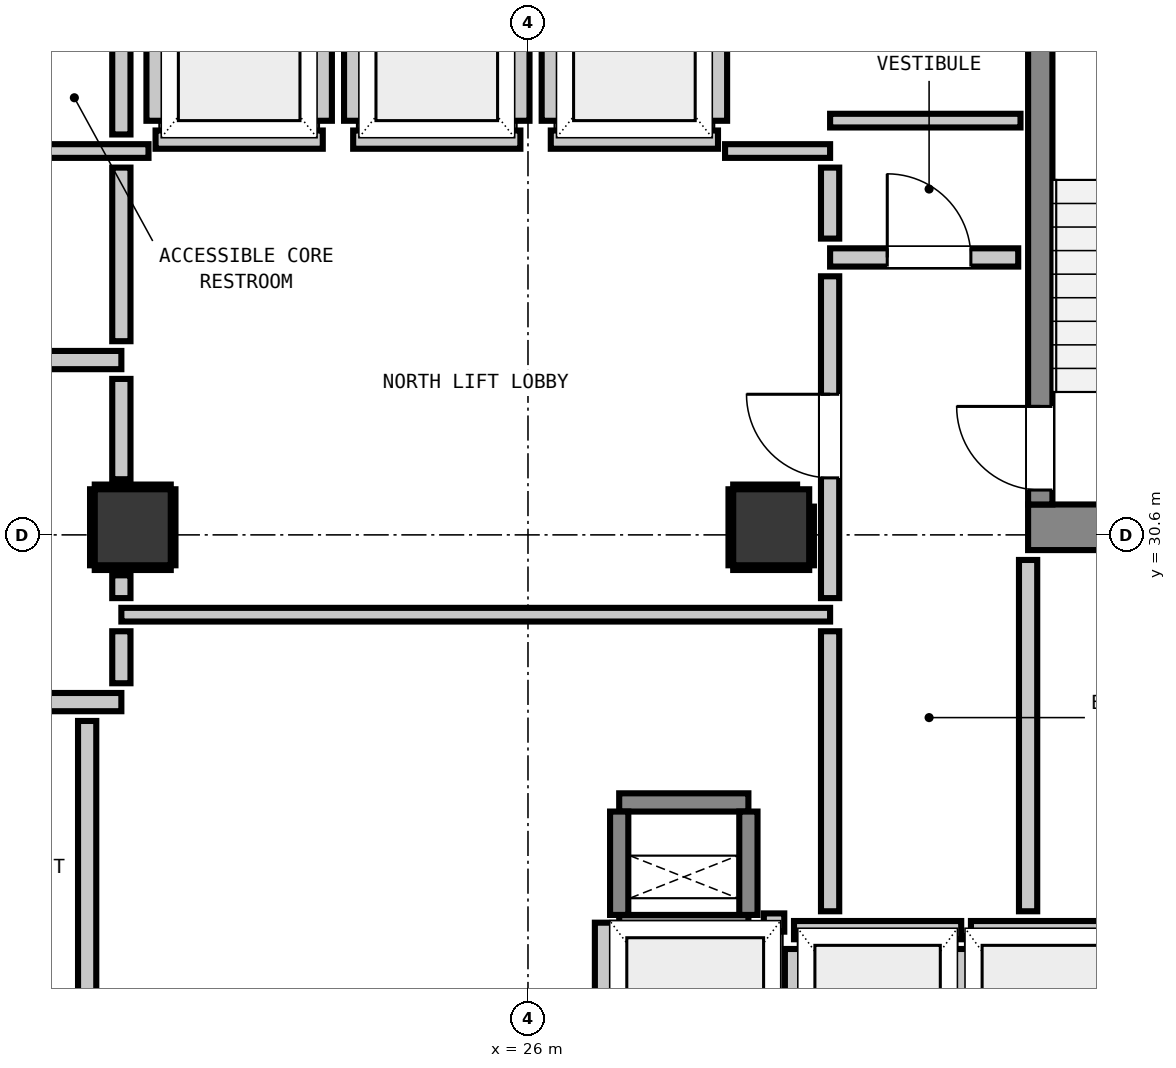
"""IFC4 building model, lengths in metres.
Left out: names, types, materials, properties, quantities, classifications, styles, units other than length and angle.
Written with IfcOpenShell. Run it as: python <this file> out.ifc"""

import sys

from ifc_helpers import new_model, si_unit, direction, frame, frame_2d, origin, origin_2d, place, context, subcontext, project, spatial, rectangle, extrude, element, fill, save


model = new_model("IFC4")
c1 = context("Model", 3, precision=1e-05, world=origin(), true_north=direction((0.0, 1.0)))
c2 = subcontext(c1, "Body", "Model", "MODEL_VIEW")
j1 = project(units=[si_unit("LENGTHUNIT", "METRE"), si_unit("PLANEANGLEUNIT", "RADIAN")], contexts=[c1])
p1 = place(None, origin())
s1 = spatial("IfcSite", under=j1, at=p1, CompositionType="ELEMENT")
p2 = place(p1, origin())
s2 = spatial("IfcBuilding", under=s1, at=p2, CompositionType="ELEMENT")
p3 = place(p2, frame((0.0, 0.0, 25.32)))
s3 = spatial("IfcBuildingStorey", under=s2, at=p3, CompositionType="ELEMENT", Elevation=25.32)
p4 = place(p3, frame((32.58, 30.7, 0.0), z_axis=(0.0, 0.0, 1.0), x_axis=(1.0, 0.0, 0.0)))
e1 = element("IfcWall", 1, at=p4, inside=s3, PredefinedType="SHEAR", context=c2, shape_type="SweptSolid", body=[
    extrude(rectangle(XDim=3.415, YDim=0.6, at=frame_2d((1.708, 0.0))), origin(), (0.0, 0.0, 1.0), 3.32),
])
p5 = place(p3, frame((32.74, 31.0, 0.0), z_axis=(0.0, 0.0, 1.0), x_axis=(0.0, 1.0, 0.0)))
e2 = element("IfcWall", 2, at=p5, inside=s3, PredefinedType="SHEAR", context=c2, shape_type="SweptSolid", body=[
    extrude(rectangle(XDim=7.8, YDim=0.32, at=frame_2d((3.9, 0.0))), origin(), (0.0, 0.0, 1.0), 3.32),
])
p6 = place(p5, frame((0.19, 0.0, 0.0)))
e3 = element("IfcOpeningElement", 3, at=p6, cuts=e2, PredefinedType="OPENING", context=c2, shape_type="SweptSolid", body=[
    extrude(rectangle(XDim=1.1, YDim=2.15, at=frame_2d((0.55, 1.075))), frame((0.0, 0.17, 0.0), z_axis=(0.0, -1.0, 0.0), x_axis=(1.0, 0.0, 0.0)), (0.0, 0.0, 1.0), 0.34),
])
for number, where, z_axis, x_axis in (
    (4, (27.2, 25.48, 0.0), (0.0, 0.0, 1.0), (1.0, 0.0, 0.0)),
    (5, (27.2, 27.08, 0.0), (0.0, 0.0, 1.0), (1.0, 0.0, 0.0)),
):
    element("IfcWall", number, at=place(p3, frame(where, z_axis=z_axis, x_axis=x_axis)), inside=s3, PredefinedType="SHEAR", context=c2, shape_type="SweptSolid", body=[
        extrude(rectangle(XDim=1.7, YDim=0.24, at=frame_2d((0.85, 0.0))), origin(), (0.0, 0.0, 1.0), 3.32),
    ])
for number, where, z_axis, x_axis in (
    (6, (27.2, 25.6, 0.0), (0.0, 0.0, 1.0), (0.0, 1.0, 0.0)),
    (7, (28.9, 25.6, 0.0), (0.0, 0.0, 1.0), (0.0, 1.0, 0.0)),
):
    element("IfcWall", number, at=place(p3, frame(where, z_axis=z_axis, x_axis=x_axis)), inside=s3, PredefinedType="SHEAR", context=c2, shape_type="SweptSolid", body=[
        extrude(rectangle(XDim=1.36, YDim=0.24, at=frame_2d((0.68, 0.0))), origin(), (0.0, 0.0, 1.0), 3.32),
    ])
for number, where, z_axis, x_axis in (
    (8, (20.8, 30.7, 0.0), (0.0, 0.0, 1.0), (1.0, 0.0, 0.0)),
    (9, (29.2, 30.7, 0.0), (0.0, 0.0, 1.0), (1.0, 0.0, 0.0)),
):
    element("IfcColumn", number, at=place(p3, frame(where, z_axis=z_axis, x_axis=x_axis)), inside=s3, PredefinedType="COLUMN", context=c2, shape_type="SweptSolid", body=[
        extrude(rectangle(XDim=1.0, YDim=1.0, at=origin_2d()), origin(), (0.0, 0.0, 1.0), 3.32),
    ])
p7 = place(p3, frame((21.1, 35.8, 0.0), z_axis=(0.0, 0.0, 1.0), x_axis=(1.0, 0.0, 0.0)))
e10 = element("IfcWall", 10, at=p7, inside=s3, PredefinedType="PARTITIONING", context=c2, shape_type="SweptSolid", body=[
    extrude(rectangle(XDim=2.2, YDim=0.24, at=frame_2d((1.1, 0.0))), origin(), (0.0, 0.0, 1.0), 3.06),
])
p8 = place(p3, frame((21.1, 36.048, 0.0), z_axis=(0.0, 0.0, 1.0), x_axis=(0.0, 1.0, 0.0)))
e11 = element("IfcWall", 11, at=p8, inside=s3, PredefinedType="PARTITIONING", context=c2, shape_type="SweptSolid", body=[
    extrude(rectangle(XDim=2.104, YDim=0.24, at=frame_2d((1.052, 0.0))), origin(), (0.0, 0.0, 1.0), 2.295),
])
p9 = place(p3, frame((23.3, 36.048, 0.0), z_axis=(0.0, 0.0, 1.0), x_axis=(0.0, 1.0, 0.0)))
e12 = element("IfcWall", 12, at=p9, inside=s3, PredefinedType="PARTITIONING", context=c2, shape_type="SweptSolid", body=[
    extrude(rectangle(XDim=2.104, YDim=0.24, at=frame_2d((1.052, 0.0))), origin(), (0.0, 0.0, 1.0), 3.06),
])
p10 = place(p3, frame((23.7, 35.8, 0.0), z_axis=(0.0, 0.0, 1.0), x_axis=(1.0, 0.0, 0.0)))
e13 = element("IfcWall", 13, at=p10, inside=s3, PredefinedType="PARTITIONING", context=c2, shape_type="SweptSolid", body=[
    extrude(rectangle(XDim=2.2, YDim=0.24, at=frame_2d((1.1, 0.0))), origin(), (0.0, 0.0, 1.0), 3.06),
])
for number, where, z_axis, x_axis in (
    (14, (23.7, 36.048, 0.0), (0.0, 0.0, 1.0), (0.0, 1.0, 0.0)),
    (15, (25.9, 36.048, 0.0), (0.0, 0.0, 1.0), (0.0, 1.0, 0.0)),
):
    element("IfcWall", number, at=place(p3, frame(where, z_axis=z_axis, x_axis=x_axis)), inside=s3, PredefinedType="PARTITIONING", context=c2, shape_type="SweptSolid", body=[
        extrude(rectangle(XDim=2.104, YDim=0.24, at=frame_2d((1.052, 0.0))), origin(), (0.0, 0.0, 1.0), 3.06),
    ])
p11 = place(p3, frame((26.3, 35.8, 0.0), z_axis=(0.0, 0.0, 1.0), x_axis=(1.0, 0.0, 0.0)))
e16 = element("IfcWall", 16, at=p11, inside=s3, PredefinedType="PARTITIONING", context=c2, shape_type="SweptSolid", body=[
    extrude(rectangle(XDim=2.2, YDim=0.24, at=frame_2d((1.1, 0.0))), origin(), (0.0, 0.0, 1.0), 3.06),
])
for number, where, z_axis, x_axis in (
    (17, (26.3, 36.048, 0.0), (0.0, 0.0, 1.0), (0.0, 1.0, 0.0)),
    (18, (28.5, 36.048, 0.0), (0.0, 0.0, 1.0), (0.0, 1.0, 0.0)),
):
    element("IfcWall", number, at=place(p3, frame(where, z_axis=z_axis, x_axis=x_axis)), inside=s3, PredefinedType="PARTITIONING", context=c2, shape_type="SweptSolid", body=[
        extrude(rectangle(XDim=2.104, YDim=0.24, at=frame_2d((1.052, 0.0))), origin(), (0.0, 0.0, 1.0), 3.06),
    ])
p12 = place(p3, frame((29.5, 25.4, 0.0), z_axis=(0.0, 0.0, 1.0), x_axis=(1.0, 0.0, 0.0)))
e19 = element("IfcWall", 19, at=p12, inside=s3, PredefinedType="PARTITIONING", context=c2, shape_type="SweptSolid", body=[
    extrude(rectangle(XDim=2.2, YDim=0.24, at=frame_2d((1.1, 0.0))), origin(), (0.0, 0.0, 1.0), 3.06),
])
p13 = place(p3, frame((29.5, 22.632, 0.0), z_axis=(0.0, 0.0, 1.0), x_axis=(0.0, 1.0, 0.0)))
e20 = element("IfcWall", 20, at=p13, inside=s3, PredefinedType="PARTITIONING", context=c2, shape_type="SweptSolid", body=[
    extrude(rectangle(XDim=2.52, YDim=0.24, at=frame_2d((1.26, 0.0))), origin(), (0.0, 0.0, 1.0), 2.295),
])
p14 = place(p3, frame((31.7, 22.73, 0.0), z_axis=(0.0, 0.0, 1.0), x_axis=(0.0, 1.0, 0.0)))
e21 = element("IfcWall", 21, at=p14, inside=s3, PredefinedType="PARTITIONING", context=c2, shape_type="SweptSolid", body=[
    extrude(rectangle(XDim=2.422, YDim=0.24, at=frame_2d((1.211, 0.0))), origin(), (0.0, 0.0, 1.0), 3.06),
])
p15 = place(p3, frame((31.828, 25.4, 0.0), z_axis=(0.0, 0.0, 1.0), x_axis=(1.0, 0.0, 0.0)))
e22 = element("IfcWall", 22, at=p15, inside=s3, PredefinedType="PARTITIONING", context=c2, shape_type="SweptSolid", body=[
    extrude(rectangle(XDim=2.072, YDim=0.24, at=frame_2d((1.036, 0.0))), origin(), (0.0, 0.0, 1.0), 3.06),
])
p16 = place(p3, frame((29.103, 25.5, 0.0), z_axis=(0.0, 0.0, 1.0), x_axis=(1.0, 0.0, 0.0)))
e23 = element("IfcWall", 23, at=p16, inside=s3, PredefinedType="PARTITIONING", context=c2, shape_type="SweptSolid", body=[
    extrude(rectangle(XDim=0.269, YDim=0.24, at=frame_2d((0.135, 0.0))), origin(), (0.0, 0.0, 1.0), 3.06),
])
p17 = place(p3, frame((27.0, 22.73, 0.0), z_axis=(0.0, 0.0, 1.0), x_axis=(0.0, 1.0, 0.0)))
e24 = element("IfcWall", 24, at=p17, inside=s3, PredefinedType="PARTITIONING", context=c2, shape_type="SweptSolid", body=[
    extrude(rectangle(XDim=2.768, YDim=0.24, at=frame_2d((1.384, 0.0))), origin(), (0.0, 0.0, 1.0), 3.06),
])
p18 = place(p3, frame((17.45, 28.4, 0.0), z_axis=(0.0, 0.0, 1.0), x_axis=(1.0, 0.0, 0.0)))
e25 = element("IfcWall", 25, at=p18, inside=s3, PredefinedType="PARTITIONING", context=c2, shape_type="SweptSolid", body=[
    extrude(rectangle(XDim=3.2, YDim=0.24, at=frame_2d((1.6, 0.0))), origin(), (0.0, 0.0, 1.0), 3.06),
])
p19 = place(p18, frame((0.784, 0.0, 0.0)))
e26 = element("IfcOpeningElement", 26, at=p19, cuts=e25, PredefinedType="OPENING", context=c2, shape_type="SweptSolid", body=[
    extrude(rectangle(XDim=1.1, YDim=2.15, at=frame_2d((0.55, 1.075))), frame((0.0, 0.13, 0.0), z_axis=(0.0, -1.0, 0.0), x_axis=(1.0, 0.0, 0.0)), (0.0, 0.0, 1.0), 0.26),
])
p20 = place(p3, frame((17.45, 32.9, 0.0), z_axis=(0.0, 0.0, 1.0), x_axis=(1.0, 0.0, 0.0)))
e27 = element("IfcWall", 27, at=p20, inside=s3, PredefinedType="PARTITIONING", context=c2, shape_type="SweptSolid", body=[
    extrude(rectangle(XDim=3.2, YDim=0.24, at=frame_2d((1.6, 0.0))), origin(), (0.0, 0.0, 1.0), 3.06),
])
p21 = place(p20, frame((0.159, 0.0, 0.0)))
e28 = element("IfcOpeningElement", 28, at=p21, cuts=e27, PredefinedType="OPENING", context=c2, shape_type="SweptSolid", body=[
    extrude(rectangle(XDim=1.1, YDim=2.15, at=frame_2d((0.55, 1.075))), frame((0.0, 0.13, 0.0), z_axis=(0.0, -1.0, 0.0), x_axis=(1.0, 0.0, 0.0)), (0.0, 0.0, 1.0), 0.26),
])
p22 = place(p3, frame((29.975, 34.25, 0.0), z_axis=(0.0, 0.0, 1.0), x_axis=(1.0, 0.0, 0.0)))
e29 = element("IfcWall", 29, at=p22, inside=s3, PredefinedType="PARTITIONING", context=c2, shape_type="SweptSolid", body=[
    extrude(rectangle(XDim=2.475, YDim=0.24, at=frame_2d((1.237, 0.0))), origin(), (0.0, 0.0, 1.0), 3.06),
])
p23 = place(p22, frame((0.752, 0.0, 0.0)))
e30 = element("IfcOpeningElement", 30, at=p23, cuts=e29, PredefinedType="OPENING", context=c2, shape_type="SweptSolid", body=[
    extrude(rectangle(XDim=1.1, YDim=2.15, at=frame_2d((0.55, 1.075))), frame((0.0, 0.13, 0.0), z_axis=(0.0, -1.0, 0.0), x_axis=(1.0, 0.0, 0.0)), (0.0, 0.0, 1.0), 0.26),
])
p24 = place(p3, frame((20.65, 29.55, 0.0), z_axis=(0.0, 0.0, 1.0), x_axis=(1.0, 0.0, 0.0)))
e31 = element("IfcWall", 31, at=p24, inside=s3, PredefinedType="PARTITIONING", context=c2, shape_type="SweptSolid", body=[
    extrude(rectangle(XDim=9.325, YDim=0.18, at=frame_2d((4.663, 0.0))), origin(), (0.0, 0.0, 1.0), 3.06),
])
p25 = place(p3, frame((18.95, 35.65, 0.0), z_axis=(0.0, 0.0, 1.0), x_axis=(1.0, 0.0, 0.0)))
e32 = element("IfcWall", 32, at=p25, inside=s3, PredefinedType="PARTITIONING", context=c2, shape_type="SweptSolid", body=[
    extrude(rectangle(XDim=2.057, YDim=0.18, at=frame_2d((1.029, 0.0))), origin(), (0.0, 0.0, 1.0), 3.06),
])
p26 = place(p3, frame((28.593, 35.65, 0.0), z_axis=(0.0, 0.0, 1.0), x_axis=(1.0, 0.0, 0.0)))
e33 = element("IfcWall", 33, at=p26, inside=s3, PredefinedType="PARTITIONING", context=c2, shape_type="SweptSolid", body=[
    extrude(rectangle(XDim=1.382, YDim=0.18, at=frame_2d((0.691, 0.0))), origin(), (0.0, 0.0, 1.0), 3.06),
])
p27 = place(p3, frame((29.975, 36.05, 0.0), z_axis=(0.0, 0.0, 1.0), x_axis=(1.0, 0.0, 0.0)))
e34 = element("IfcWall", 34, at=p27, inside=s3, PredefinedType="PARTITIONING", context=c2, shape_type="SweptSolid", body=[
    extrude(rectangle(XDim=2.505, YDim=0.18, at=frame_2d((1.252, 0.0))), origin(), (0.0, 0.0, 1.0), 3.06),
])
p28 = place(p3, frame((20.2, 22.586, 0.0), z_axis=(0.0, 0.0, 1.0), x_axis=(0.0, 1.0, 0.0)))
e35 = element("IfcWall", 35, at=p28, inside=s3, PredefinedType="PARTITIONING", context=c2, shape_type="SweptSolid", body=[
    extrude(rectangle(XDim=5.566, YDim=0.24, at=frame_2d((2.783, 0.0))), origin(), (0.0, 0.0, 1.0), 3.06),
])
p29 = place(p3, frame((20.65, 28.648, 0.0), z_axis=(0.0, 0.0, 1.0), x_axis=(0.0, 1.0, 0.0)))
e36 = element("IfcWall", 36, at=p29, inside=s3, PredefinedType="PARTITIONING", context=c2, shape_type="SweptSolid", body=[
    extrude(rectangle(XDim=0.684, YDim=0.24, at=frame_2d((0.342, 0.0))), origin(), (0.0, 0.0, 1.0), 2.295),
])
p30 = place(p3, frame((20.65, 29.768, 0.0), z_axis=(0.0, 0.0, 1.0), x_axis=(0.0, 1.0, 0.0)))
e37 = element("IfcWall", 37, at=p30, inside=s3, PredefinedType="PARTITIONING", context=c2, shape_type="SweptSolid", body=[
    extrude(rectangle(XDim=0.3, YDim=0.24, at=frame_2d((0.15, 0.0))), origin(), (0.0, 0.0, 1.0), 2.295),
])
p31 = place(p3, frame((20.65, 31.332, 0.0), z_axis=(0.0, 0.0, 1.0), x_axis=(0.0, 1.0, 0.0)))
e38 = element("IfcWall", 38, at=p31, inside=s3, PredefinedType="PARTITIONING", context=c2, shape_type="SweptSolid", body=[
    extrude(rectangle(XDim=1.32, YDim=0.24, at=frame_2d((0.66, 0.0))), origin(), (0.0, 0.0, 1.0), 2.295),
])
p32 = place(p3, frame((20.65, 33.148, 0.0), z_axis=(0.0, 0.0, 1.0), x_axis=(0.0, 1.0, 0.0)))
e39 = element("IfcWall", 39, at=p32, inside=s3, PredefinedType="PARTITIONING", context=c2, shape_type="SweptSolid", body=[
    extrude(rectangle(XDim=2.284, YDim=0.24, at=frame_2d((1.142, 0.0))), origin(), (0.0, 0.0, 1.0), 2.295),
])
p33 = place(p3, frame((20.65, 35.868, 0.0), z_axis=(0.0, 0.0, 1.0), x_axis=(0.0, 1.0, 0.0)))
e40 = element("IfcWall", 40, at=p33, inside=s3, PredefinedType="PARTITIONING", context=c2, shape_type="SweptSolid", body=[
    extrude(rectangle(XDim=2.684, YDim=0.24, at=frame_2d((1.342, 0.0))), origin(), (0.0, 0.0, 1.0), 2.295),
])
p34 = place(p3, frame((29.975, 25.648, 0.0), z_axis=(0.0, 0.0, 1.0), x_axis=(0.0, 1.0, 0.0)))
e41 = element("IfcWall", 41, at=p34, inside=s3, PredefinedType="PARTITIONING", context=c2, shape_type="SweptSolid", body=[
    extrude(rectangle(XDim=3.684, YDim=0.24, at=frame_2d((1.842, 0.0))), origin(), (0.0, 0.0, 1.0), 3.06),
])
p35 = place(p3, frame((29.975, 29.768, 0.0), z_axis=(0.0, 0.0, 1.0), x_axis=(0.0, 1.0, 0.0)))
e42 = element("IfcWall", 42, at=p35, inside=s3, PredefinedType="PARTITIONING", context=c2, shape_type="SweptSolid", body=[
    extrude(rectangle(XDim=4.234, YDim=0.24, at=frame_2d((2.117, 0.0))), origin(), (0.0, 0.0, 1.0), 3.06),
])
p36 = place(p35, frame((1.582, 0.0, 0.0)))
e43 = element("IfcOpeningElement", 43, at=p36, cuts=e42, PredefinedType="OPENING", context=c2, shape_type="SweptSolid", body=[
    extrude(rectangle(XDim=1.1, YDim=2.15, at=frame_2d((0.55, 1.075))), frame((0.0, 0.13, 0.0), z_axis=(0.0, -1.0, 0.0), x_axis=(1.0, 0.0, 0.0)), (0.0, 0.0, 1.0), 0.26),
])
p37 = place(p3, frame((29.975, 34.498, 0.0), z_axis=(0.0, 0.0, 1.0), x_axis=(0.0, 1.0, 0.0)))
e44 = element("IfcWall", 44, at=p37, inside=s3, PredefinedType="PARTITIONING", context=c2, shape_type="SweptSolid", body=[
    extrude(rectangle(XDim=0.934, YDim=0.24, at=frame_2d((0.467, 0.0))), origin(), (0.0, 0.0, 1.0), 3.06),
])
p38 = place(p3, frame((32.58, 25.648, 0.0), z_axis=(0.0, 0.0, 1.0), x_axis=(0.0, 1.0, 0.0)))
e45 = element("IfcWall", 45, at=p38, inside=s3, PredefinedType="PARTITIONING", context=c2, shape_type="SweptSolid", body=[
    extrude(rectangle(XDim=4.622, YDim=0.24, at=frame_2d((2.311, 0.0))), origin(), (0.0, 0.0, 1.0), 3.06),
])
for number, where, z_axis, x_axis in (
    (46, (20.3, 30.168, 0.0), (0.0, 0.0, 1.0), (1.0, 0.0, 0.0)),
    (47, (20.3, 31.232, 0.0), (0.0, 0.0, 1.0), (1.0, 0.0, 0.0)),
    (48, (20.268, 30.2, 0.0), (0.0, 0.0, 1.0), (0.0, 1.0, 0.0)),
    (49, (21.332, 30.2, 0.0), (0.0, 0.0, 1.0), (0.0, 1.0, 0.0)),
    (50, (28.7, 30.168, 0.0), (0.0, 0.0, 1.0), (1.0, 0.0, 0.0)),
):
    element("IfcWall", number, at=place(p3, frame(where, z_axis=z_axis, x_axis=x_axis)), inside=s3, PredefinedType="PARTITIONING", context=c2, shape_type="SweptSolid", body=[
        extrude(rectangle(XDim=1.0, YDim=0.06, at=frame_2d((0.5, 0.0))), origin(), (0.0, 0.0, 1.0), 1.45),
    ])
p39 = place(p3, frame((28.7, 31.232, 0.0), z_axis=(0.0, 0.0, 1.0), x_axis=(1.0, 0.0, 0.0)))
e51 = element("IfcWall", 51, at=p39, inside=s3, PredefinedType="PARTITIONING", context=c2, shape_type="SweptSolid", body=[
    extrude(rectangle(XDim=0.841, YDim=0.06, at=frame_2d((0.42, 0.0))), origin(), (0.0, 0.0, 1.0), 1.45),
])
p40 = place(p3, frame((28.668, 30.2, 0.0), z_axis=(0.0, 0.0, 1.0), x_axis=(0.0, 1.0, 0.0)))
e52 = element("IfcWall", 52, at=p40, inside=s3, PredefinedType="PARTITIONING", context=c2, shape_type="SweptSolid", body=[
    extrude(rectangle(XDim=1.0, YDim=0.06, at=frame_2d((0.5, 0.0))), origin(), (0.0, 0.0, 1.0), 1.45),
])
p41 = place(p3, frame((29.732, 30.2, 0.0), z_axis=(0.0, 0.0, 1.0), x_axis=(0.0, 1.0, 0.0)))
e53 = element("IfcWall", 53, at=p41, inside=s3, PredefinedType="PARTITIONING", context=c2, shape_type="SweptSolid", body=[
    extrude(rectangle(XDim=0.772, YDim=0.06, at=frame_2d((0.386, 0.0))), origin(), (0.0, 0.0, 1.0), 1.45),
])
p42 = place(p6, origin())
e54 = element("IfcDoor", 54, at=p42, inside=s3, OperationType="SINGLE_SWING_RIGHT", PredefinedType="DOOR", context=c2, shape_type="SweptSolid", body=[
    extrude(rectangle(XDim=1.1, YDim=2.15, at=frame_2d((0.55, 1.075))), frame((0.0, 0.025, 0.0), z_axis=(0.0, -1.0, 0.0), x_axis=(1.0, 0.0, 0.0)), (0.0, 0.0, 1.0), 0.05),
])
fill(e3, e54)
p43 = place(p36, origin())
e55 = element("IfcDoor", 55, at=p43, inside=s3, OperationType="SINGLE_SWING_RIGHT", PredefinedType="DOOR", context=c2, shape_type="SweptSolid", body=[
    extrude(rectangle(XDim=1.1, YDim=2.15, at=frame_2d((0.55, 1.075))), frame((0.0, 0.025, 0.0), z_axis=(0.0, -1.0, 0.0), x_axis=(1.0, 0.0, 0.0)), (0.0, 0.0, 1.0), 0.05),
])
fill(e43, e55)
p44 = place(p23, origin())
e56 = element("IfcDoor", 56, at=p44, inside=s3, OperationType="SINGLE_SWING_LEFT", PredefinedType="DOOR", context=c2, shape_type="SweptSolid", body=[
    extrude(rectangle(XDim=1.1, YDim=2.15, at=frame_2d((0.55, 1.075))), frame((0.0, 0.025, 0.0), z_axis=(0.0, -1.0, 0.0), x_axis=(1.0, 0.0, 0.0)), (0.0, 0.0, 1.0), 0.05),
])
fill(e30, e56)
save(model, sys.argv[1])
